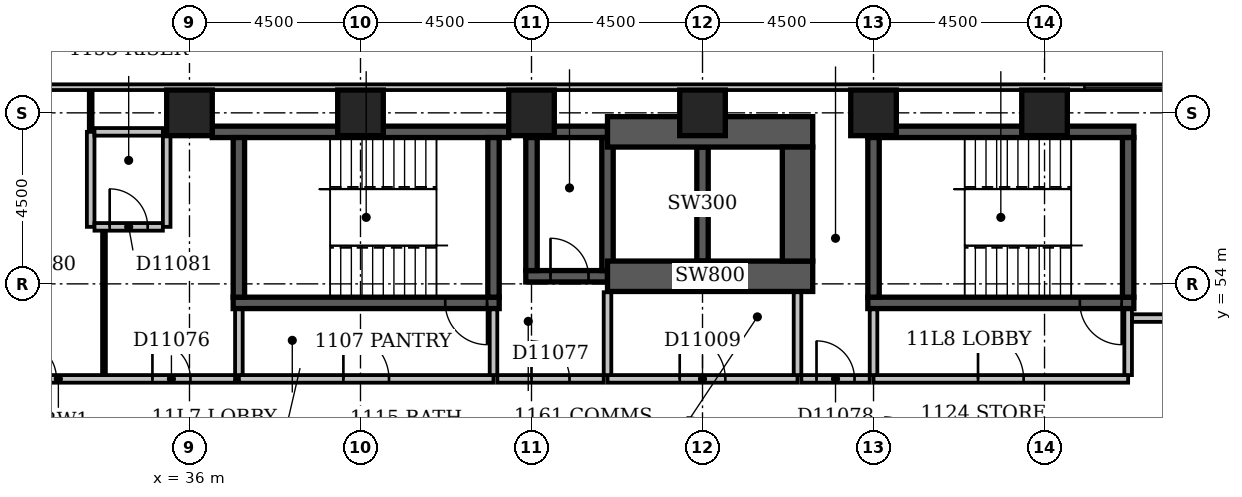
"""IFC4 building model, lengths in metres.
Left out: names, types, materials, properties, quantities, classifications, styles, units other than length and angle.
Written with IfcOpenShell. Run it as: python <this file> out.ifc"""

import sys

from ifc_helpers import new_model, si_unit, direction, frame, frame_2d, origin, origin_2d, place, context, subcontext, project, spatial, rectangle, extrude, element, fill, save


model = new_model("IFC4")
c1 = context("Model", 3, precision=1e-05, world=origin(), true_north=direction((0.0, 1.0)))
c2 = subcontext(c1, "Body", "Model", "MODEL_VIEW")
j1 = project(units=[si_unit("LENGTHUNIT", "METRE"), si_unit("PLANEANGLEUNIT", "RADIAN")], contexts=[c1])
p1 = place(None, origin())
s1 = spatial("IfcSite", under=j1, at=p1, CompositionType="ELEMENT")
p2 = place(p1, origin())
s2 = spatial("IfcBuilding", under=s1, at=p2, CompositionType="ELEMENT")
p3 = place(p2, frame((0.0, 0.0, 50.6)))
s3 = spatial("IfcBuildingStorey", under=s2, at=p3, CompositionType="ELEMENT", Elevation=50.6)
p4 = place(p3, frame((36.6, 58.0, -0.3), z_axis=(0.0, 0.0, 1.0), x_axis=(1.0, 0.0, 0.0)))
e1 = element("IfcWall", 1, at=p4, inside=s3, PredefinedType="SHEAR", context=c2, shape_type="SweptSolid", body=[
    extrude(rectangle(XDim=7.8, YDim=0.3, at=frame_2d((3.9, 0.0))), origin(), (0.0, 0.0, 1.0), 3.6),
])
p5 = place(p3, frame((37.15, 53.5, -0.3), z_axis=(0.0, 0.0, 1.0), x_axis=(1.0, 0.0, 0.0)))
e2 = element("IfcWall", 2, at=p5, inside=s3, PredefinedType="SHEAR", context=c2, shape_type="SweptSolid", body=[
    extrude(rectangle(XDim=7.0, YDim=0.3, at=frame_2d((3.5, 0.0))), origin(), (0.0, 0.0, 1.0), 3.6),
])
p6 = place(p5, frame((5.58, 0.0, 0.3)))
e3 = element("IfcOpeningElement", 3, at=p6, cuts=e2, PredefinedType="OPENING", context=c2, shape_type="SweptSolid", body=[
    extrude(rectangle(XDim=1.1, YDim=2.1, at=frame_2d((0.55, 1.05))), frame((0.0, 0.162, 0.0), z_axis=(0.0, -1.0, 0.0), x_axis=(1.0, 0.0, 0.0)), (0.0, 0.0, 1.0), 0.324),
])
for number, where, z_axis, x_axis in (
    (4, (37.3, 53.65, -0.3), (0.0, 0.0, 1.0), (0.0, 1.0, 0.0)),
    (5, (44.0, 53.65, -0.3), (0.0, 0.0, 1.0), (0.0, 1.0, 0.0)),
):
    element("IfcWall", number, at=place(p3, frame(where, z_axis=z_axis, x_axis=x_axis)), inside=s3, PredefinedType="SHEAR", context=c2, shape_type="SweptSolid", body=[
        extrude(rectangle(XDim=4.2, YDim=0.3, at=frame_2d((2.1, 0.0))), origin(), (0.0, 0.0, 1.0), 3.6),
    ])
p7 = place(p3, frame((44.85, 54.2, -0.3), z_axis=(0.0, 0.0, 1.0), x_axis=(1.0, 0.0, 0.0)))
e6 = element("IfcWall", 6, at=p7, inside=s3, PredefinedType="SHEAR", context=c2, shape_type="SweptSolid", body=[
    extrude(rectangle(XDim=2.15, YDim=0.3, at=frame_2d((1.075, 0.0))), origin(), (0.0, 0.0, 1.0), 3.6),
])
p8 = place(p7, frame((0.65, 0.0, 0.3)))
e7 = element("IfcOpeningElement", 7, at=p8, cuts=e6, PredefinedType="OPENING", context=c2, shape_type="SweptSolid", body=[
    extrude(rectangle(XDim=1.0, YDim=2.1, at=frame_2d((0.5, 1.05))), frame((0.0, 0.162, 0.0), z_axis=(0.0, -1.0, 0.0), x_axis=(1.0, 0.0, 0.0)), (0.0, 0.0, 1.0), 0.324),
])
p9 = place(p3, frame((44.85, 58.0, -0.3), z_axis=(0.0, 0.0, 1.0), x_axis=(1.0, 0.0, 0.0)))
e8 = element("IfcWall", 8, at=p9, inside=s3, PredefinedType="SHEAR", context=c2, shape_type="SweptSolid", body=[
    extrude(rectangle(XDim=2.15, YDim=0.3, at=frame_2d((1.075, 0.0))), origin(), (0.0, 0.0, 1.0), 3.6),
])
p10 = place(p3, frame((45.0, 54.35, -0.3), z_axis=(0.0, 0.0, 1.0), x_axis=(0.0, 1.0, 0.0)))
e9 = element("IfcWall", 9, at=p10, inside=s3, PredefinedType="SHEAR", context=c2, shape_type="SweptSolid", body=[
    extrude(rectangle(XDim=3.5, YDim=0.3, at=frame_2d((1.75, 0.0))), origin(), (0.0, 0.0, 1.0), 3.6),
])
p11 = place(p3, frame((47.0, 54.2, -0.3), z_axis=(0.0, 0.0, 1.0), x_axis=(1.0, 0.0, 0.0)))
e10 = element("IfcWall", 10, at=p11, inside=s3, PredefinedType="SHEAR", context=c2, shape_type="SweptSolid", body=[
    extrude(rectangle(XDim=5.4, YDim=0.8, at=frame_2d((2.7, 0.0))), origin(), (0.0, 0.0, 1.0), 3.6),
])
p12 = place(p3, frame((47.0, 54.35, -0.3), z_axis=(0.0, 0.0, 1.0), x_axis=(0.0, 1.0, 0.0)))
e11 = element("IfcWall", 11, at=p12, inside=s3, PredefinedType="SHEAR", context=c2, shape_type="SweptSolid", body=[
    extrude(rectangle(XDim=3.5, YDim=0.3, at=frame_2d((1.75, 0.0))), origin(), (0.0, 0.0, 1.0), 3.6),
])
p13 = place(p3, frame((47.0, 58.0, -0.3), z_axis=(0.0, 0.0, 1.0), x_axis=(1.0, 0.0, 0.0)))
e12 = element("IfcWall", 12, at=p13, inside=s3, PredefinedType="SHEAR", context=c2, shape_type="SweptSolid", body=[
    extrude(rectangle(XDim=5.4, YDim=0.8, at=frame_2d((2.7, 0.0))), origin(), (0.0, 0.0, 1.0), 3.6),
])
p14 = place(p3, frame((49.5, 54.6, -0.3), z_axis=(0.0, 0.0, 1.0), x_axis=(0.0, 1.0, 0.0)))
e13 = element("IfcWall", 13, at=p14, inside=s3, PredefinedType="SHEAR", context=c2, shape_type="SweptSolid", body=[
    extrude(rectangle(XDim=3.0, YDim=0.3, at=frame_2d((1.5, 0.0))), origin(), (0.0, 0.0, 1.0), 3.6),
])
p15 = place(p3, frame((52.0, 54.6, -0.3), z_axis=(0.0, 0.0, 1.0), x_axis=(0.0, 1.0, 0.0)))
e14 = element("IfcWall", 14, at=p15, inside=s3, PredefinedType="SHEAR", context=c2, shape_type="SweptSolid", body=[
    extrude(rectangle(XDim=3.0, YDim=0.8, at=frame_2d((1.5, 0.0))), origin(), (0.0, 0.0, 1.0), 3.6),
])
p16 = place(p3, frame((53.85, 53.5, -0.3), z_axis=(0.0, 0.0, 1.0), x_axis=(1.0, 0.0, 0.0)))
e15 = element("IfcWall", 15, at=p16, inside=s3, PredefinedType="SHEAR", context=c2, shape_type="SweptSolid", body=[
    extrude(rectangle(XDim=7.0, YDim=0.3, at=frame_2d((3.5, 0.0))), origin(), (0.0, 0.0, 1.0), 3.6),
])
p17 = place(p16, frame((5.58, 0.0, 0.3)))
e16 = element("IfcOpeningElement", 16, at=p17, cuts=e15, PredefinedType="OPENING", context=c2, shape_type="SweptSolid", body=[
    extrude(rectangle(XDim=1.1, YDim=2.1, at=frame_2d((0.55, 1.05))), frame((0.0, 0.162, 0.0), z_axis=(0.0, -1.0, 0.0), x_axis=(1.0, 0.0, 0.0)), (0.0, 0.0, 1.0), 0.324),
])
p18 = place(p3, frame((53.85, 58.0, -0.3), z_axis=(0.0, 0.0, 1.0), x_axis=(1.0, 0.0, 0.0)))
e17 = element("IfcWall", 17, at=p18, inside=s3, PredefinedType="SHEAR", context=c2, shape_type="SweptSolid", body=[
    extrude(rectangle(XDim=7.0, YDim=0.3, at=frame_2d((3.5, 0.0))), origin(), (0.0, 0.0, 1.0), 3.6),
])
for number, where, z_axis, x_axis in (
    (18, (54.0, 53.65, -0.3), (0.0, 0.0, 1.0), (0.0, 1.0, 0.0)),
    (19, (60.7, 53.65, -0.3), (0.0, 0.0, 1.0), (0.0, 1.0, 0.0)),
):
    element("IfcWall", number, at=place(p3, frame(where, z_axis=z_axis, x_axis=x_axis)), inside=s3, PredefinedType="SHEAR", context=c2, shape_type="SweptSolid", body=[
        extrude(rectangle(XDim=4.2, YDim=0.3, at=frame_2d((2.1, 0.0))), origin(), (0.0, 0.0, 1.0), 3.6),
    ])
for number, where, z_axis, x_axis in (
    (20, (36.0, 58.5, -0.3), (0.0, 0.0, 1.0), (1.0, 0.0, 0.0)),
    (21, (40.5, 58.5, -0.3), (0.0, 0.0, 1.0), (1.0, 0.0, 0.0)),
    (22, (45.0, 58.5, -0.3), (0.0, 0.0, 1.0), (1.0, 0.0, 0.0)),
    (23, (49.5, 58.5, -0.3), (0.0, 0.0, 1.0), (1.0, 0.0, 0.0)),
    (24, (54.0, 58.5, -0.3), (0.0, 0.0, 1.0), (1.0, 0.0, 0.0)),
    (25, (58.5, 58.5, -0.3), (0.0, 0.0, 1.0), (1.0, 0.0, 0.0)),
):
    element("IfcColumn", number, at=place(p3, frame(where, z_axis=z_axis, x_axis=x_axis)), inside=s3, PredefinedType="COLUMN", context=c2, shape_type="SweptSolid", body=[
        extrude(rectangle(XDim=1.2, YDim=1.2, at=origin_2d()), origin(), (0.0, 0.0, 1.0), 3.6),
    ])
p19 = place(p3, frame((68.1, 59.175, 0.0), z_axis=(0.0, 0.0, 1.0), x_axis=(-1.0, 0.0, 0.0)))
e26 = element("IfcWall", 26, at=p19, inside=s3, PredefinedType="STANDARD", context=c2, shape_type="SweptSolid", body=[
    extrude(rectangle(XDim=68.85, YDim=0.15, at=frame_2d((34.425, 0.0))), origin(), (0.0, 0.0, 1.0), 2.7),
])
p20 = place(p19, frame((2.977, 0.0, 0.6)))
e27 = element("IfcOpeningElement", 27, at=p20, cuts=e26, PredefinedType="OPENING", context=c2, shape_type="SweptSolid", body=[
    extrude(rectangle(XDim=1.2, YDim=1.8, at=frame_2d((0.6, 0.9))), frame((0.0, 0.087, 0.0), z_axis=(0.0, -1.0, 0.0), x_axis=(1.0, 0.0, 0.0)), (0.0, 0.0, 1.0), 0.174),
])
p21 = place(p19, frame((6.15, 0.0, 0.6)))
e28 = element("IfcOpeningElement", 28, at=p21, cuts=e26, PredefinedType="OPENING", context=c2, shape_type="SweptSolid", body=[
    extrude(rectangle(XDim=2.4, YDim=1.8, at=frame_2d((1.2, 0.9))), frame((0.0, 0.087, 0.0), z_axis=(0.0, -1.0, 0.0), x_axis=(1.0, 0.0, 0.0)), (0.0, 0.0, 1.0), 0.174),
])
p22 = place(p19, frame((37.65, 0.0, 0.6)))
e29 = element("IfcOpeningElement", 29, at=p22, cuts=e26, PredefinedType="OPENING", context=c2, shape_type="SweptSolid", body=[
    extrude(rectangle(XDim=2.4, YDim=1.8, at=frame_2d((1.2, 0.9))), frame((0.0, 0.087, 0.0), z_axis=(0.0, -1.0, 0.0), x_axis=(1.0, 0.0, 0.0)), (0.0, 0.0, 1.0), 0.174),
])
p23 = place(p3, frame((47.0, 51.5, 0.0), z_axis=(0.0, 0.0, 1.0), x_axis=(1.0, 0.0, 0.0)))
e30 = element("IfcWall", 30, at=p23, inside=s3, PredefinedType="PARTITIONING", context=c2, shape_type="SweptSolid", body=[
    extrude(rectangle(XDim=5.0, YDim=0.2, at=frame_2d((2.5, 0.0))), origin(), (0.0, 0.0, 1.0), 3.3),
])
p24 = place(p23, frame((1.9, 0.0, 0.0)))
e31 = element("IfcOpeningElement", 31, at=p24, cuts=e30, PredefinedType="OPENING", context=c2, shape_type="SweptSolid", body=[
    extrude(rectangle(XDim=1.2, YDim=2.1, at=frame_2d((0.6, 1.05))), frame((0.0, 0.112, 0.0), z_axis=(0.0, -1.0, 0.0), x_axis=(1.0, 0.0, 0.0)), (0.0, 0.0, 1.0), 0.224),
])
for number, where, z_axis, x_axis in (
    (32, (52.0, 51.6, 0.0), (0.0, 0.0, 1.0), (0.0, 1.0, 0.0)),
    (33, (47.0, 51.6, 0.0), (0.0, 0.0, 1.0), (0.0, 1.0, 0.0)),
):
    element("IfcWall", number, at=place(p3, frame(where, z_axis=z_axis, x_axis=x_axis)), inside=s3, PredefinedType="PARTITIONING", context=c2, shape_type="SweptSolid", body=[
        extrude(rectangle(XDim=2.18, YDim=0.2, at=frame_2d((1.09, 0.0))), origin(), (0.0, 0.0, 1.0), 3.3),
    ])
p25 = place(p3, frame((37.3, 51.5, 0.0), z_axis=(0.0, 0.0, 1.0), x_axis=(1.0, 0.0, 0.0)))
e34 = element("IfcWall", 34, at=p25, inside=s3, PredefinedType="PARTITIONING", context=c2, shape_type="SweptSolid", body=[
    extrude(rectangle(XDim=6.7, YDim=0.2, at=frame_2d((3.35, 0.0))), origin(), (0.0, 0.0, 1.0), 3.3),
])
p26 = place(p25, frame((2.75, 0.0, 0.0)))
e35 = element("IfcOpeningElement", 35, at=p26, cuts=e34, PredefinedType="OPENING", context=c2, shape_type="SweptSolid", body=[
    extrude(rectangle(XDim=1.2, YDim=2.1, at=frame_2d((0.6, 1.05))), frame((0.0, 0.112, 0.0), z_axis=(0.0, -1.0, 0.0), x_axis=(1.0, 0.0, 0.0)), (0.0, 0.0, 1.0), 0.224),
])
for number, where, z_axis, x_axis in (
    (36, (44.0, 51.6, 0.0), (0.0, 0.0, 1.0), (0.0, 1.0, 0.0)),
    (37, (37.3, 51.6, 0.0), (0.0, 0.0, 1.0), (0.0, 1.0, 0.0)),
):
    element("IfcWall", number, at=place(p3, frame(where, z_axis=z_axis, x_axis=x_axis)), inside=s3, PredefinedType="PARTITIONING", context=c2, shape_type="SweptSolid", body=[
        extrude(rectangle(XDim=1.73, YDim=0.2, at=frame_2d((0.865, 0.0))), origin(), (0.0, 0.0, 1.0), 3.3),
    ])
p27 = place(p3, frame((54.0, 51.5, 0.0), z_axis=(0.0, 0.0, 1.0), x_axis=(1.0, 0.0, 0.0)))
e38 = element("IfcWall", 38, at=p27, inside=s3, PredefinedType="PARTITIONING", context=c2, shape_type="SweptSolid", body=[
    extrude(rectangle(XDim=6.7, YDim=0.2, at=frame_2d((3.35, 0.0))), origin(), (0.0, 0.0, 1.0), 3.3),
])
p28 = place(p27, frame((2.75, 0.0, 0.0)))
e39 = element("IfcOpeningElement", 39, at=p28, cuts=e38, PredefinedType="OPENING", context=c2, shape_type="SweptSolid", body=[
    extrude(rectangle(XDim=1.2, YDim=2.1, at=frame_2d((0.6, 1.05))), frame((0.0, 0.112, 0.0), z_axis=(0.0, -1.0, 0.0), x_axis=(1.0, 0.0, 0.0)), (0.0, 0.0, 1.0), 0.224),
])
p29 = place(p3, frame((60.7, 51.6, 0.0), z_axis=(0.0, 0.0, 1.0), x_axis=(0.0, 1.0, 0.0)))
e40 = element("IfcWall", 40, at=p29, inside=s3, PredefinedType="PARTITIONING", context=c2, shape_type="SweptSolid", body=[
    extrude(rectangle(XDim=1.73, YDim=0.2, at=frame_2d((0.865, 0.0))), origin(), (0.0, 0.0, 1.0), 3.3),
])
p30 = place(p3, frame((54.0, 51.6, 0.0), z_axis=(0.0, 0.0, 1.0), x_axis=(0.0, 1.0, 0.0)))
e41 = element("IfcWall", 41, at=p30, inside=s3, PredefinedType="PARTITIONING", context=c2, shape_type="SweptSolid", body=[
    extrude(rectangle(XDim=1.73, YDim=0.2, at=frame_2d((0.865, 0.0))), origin(), (0.0, 0.0, 1.0), 2.6),
])
p31 = place(p3, frame((27.9, 51.5, 0.0), z_axis=(0.0, 0.0, 1.0), x_axis=(1.0, 0.0, 0.0)))
e42 = element("IfcWall", 42, at=p31, inside=s3, PredefinedType="PARTITIONING", context=c2, shape_type="SweptSolid", body=[
    extrude(rectangle(XDim=9.3, YDim=0.2, at=frame_2d((4.65, 0.0))), origin(), (0.0, 0.0, 1.0), 3.3),
])
p32 = place(p31, frame((0.675, 0.0, 0.0)))
e43 = element("IfcOpeningElement", 43, at=p32, cuts=e42, PredefinedType="OPENING", context=c2, shape_type="SweptSolid", body=[
    extrude(rectangle(XDim=0.9, YDim=2.1, at=frame_2d((0.45, 1.05))), frame((0.0, 0.112, 0.0), z_axis=(0.0, -1.0, 0.0), x_axis=(1.0, 0.0, 0.0)), (0.0, 0.0, 1.0), 0.224),
])
p33 = place(p31, frame((3.6, 0.0, 0.0)))
e44 = element("IfcOpeningElement", 44, at=p33, cuts=e42, PredefinedType="OPENING", context=c2, shape_type="SweptSolid", body=[
    extrude(rectangle(XDim=1.0, YDim=2.1, at=frame_2d((0.5, 1.05))), frame((0.0, 0.112, 0.0), z_axis=(0.0, -1.0, 0.0), x_axis=(1.0, 0.0, 0.0)), (0.0, 0.0, 1.0), 0.224),
])
p34 = place(p31, frame((7.125, 0.0, 0.0)))
e45 = element("IfcOpeningElement", 45, at=p34, cuts=e42, PredefinedType="OPENING", context=c2, shape_type="SweptSolid", body=[
    extrude(rectangle(XDim=1.0, YDim=2.1, at=frame_2d((0.5, 1.05))), frame((0.0, 0.112, 0.0), z_axis=(0.0, -1.0, 0.0), x_axis=(1.0, 0.0, 0.0)), (0.0, 0.0, 1.0), 0.224),
])
p35 = place(p3, frame((44.1, 51.5, 0.0), z_axis=(0.0, 0.0, 1.0), x_axis=(1.0, 0.0, 0.0)))
e46 = element("IfcWall", 46, at=p35, inside=s3, PredefinedType="PARTITIONING", context=c2, shape_type="SweptSolid", body=[
    extrude(rectangle(XDim=2.8, YDim=0.2, at=frame_2d((1.4, 0.0))), origin(), (0.0, 0.0, 1.0), 3.3),
])
p36 = place(p35, frame((0.9, 0.0, 0.0)))
e47 = element("IfcOpeningElement", 47, at=p36, cuts=e46, PredefinedType="OPENING", context=c2, shape_type="SweptSolid", body=[
    extrude(rectangle(XDim=1.0, YDim=2.1, at=frame_2d((0.5, 1.05))), frame((0.0, 0.112, 0.0), z_axis=(0.0, -1.0, 0.0), x_axis=(1.0, 0.0, 0.0)), (0.0, 0.0, 1.0), 0.224),
])
p37 = place(p3, frame((52.1, 51.5, 0.0), z_axis=(0.0, 0.0, 1.0), x_axis=(1.0, 0.0, 0.0)))
e48 = element("IfcWall", 48, at=p37, inside=s3, PredefinedType="PARTITIONING", context=c2, shape_type="SweptSolid", body=[
    extrude(rectangle(XDim=1.8, YDim=0.2, at=frame_2d((0.9, 0.0))), origin(), (0.0, 0.0, 1.0), 3.3),
])
p38 = place(p37, frame((0.4, 0.0, 0.0)))
e49 = element("IfcOpeningElement", 49, at=p38, cuts=e48, PredefinedType="OPENING", context=c2, shape_type="SweptSolid", body=[
    extrude(rectangle(XDim=1.0, YDim=2.1, at=frame_2d((0.5, 1.05))), frame((0.0, 0.112, 0.0), z_axis=(0.0, -1.0, 0.0), x_axis=(1.0, 0.0, 0.0)), (0.0, 0.0, 1.0), 0.224),
])
p39 = place(p3, frame((33.75, 51.6, 0.0), z_axis=(0.0, 0.0, 1.0), x_axis=(0.0, 1.0, 0.0)))
e50 = element("IfcWall", 50, at=p39, inside=s3, PredefinedType="PARTITIONING", context=c2, shape_type="SweptSolid", body=[
    extrude(rectangle(XDim=3.8, YDim=0.1, at=frame_2d((1.9, 0.0))), origin(), (0.0, 0.0, 1.0), 3.3),
])
p40 = place(p3, frame((60.8, 53.1, 0.0), z_axis=(0.0, 0.0, 1.0), x_axis=(1.0, 0.0, 0.0)))
e51 = element("IfcWall", 51, at=p40, inside=s3, PredefinedType="PARTITIONING", context=c2, shape_type="SweptSolid", body=[
    extrude(rectangle(XDim=7.3, YDim=0.2, at=frame_2d((3.65, 0.0))), origin(), (0.0, 0.0, 1.0), 3.3),
])
p41 = place(p40, frame((2.85, 0.0, 0.0)))
e52 = element("IfcOpeningElement", 52, at=p41, cuts=e51, PredefinedType="OPENING", context=c2, shape_type="SweptSolid", body=[
    extrude(rectangle(XDim=0.9, YDim=2.1, at=frame_2d((0.45, 1.05))), frame((0.0, 0.112, 0.0), z_axis=(0.0, -1.0, 0.0), x_axis=(1.0, 0.0, 0.0)), (0.0, 0.0, 1.0), 0.224),
])
p42 = place(p3, frame((33.4, 55.5, 0.0), z_axis=(0.0, 0.0, 1.0), x_axis=(0.0, 1.0, 0.0)))
e53 = element("IfcWall", 53, at=p42, inside=s3, PredefinedType="PARTITIONING", context=c2, shape_type="SweptSolid", body=[
    extrude(rectangle(XDim=2.5, YDim=0.2, at=frame_2d((1.25, 0.0))), origin(), (0.0, 0.0, 1.0), 3.3),
])
p43 = place(p3, frame((33.5, 55.5, 0.0), z_axis=(0.0, 0.0, 1.0), x_axis=(1.0, 0.0, 0.0)))
e54 = element("IfcWall", 54, at=p43, inside=s3, PredefinedType="PARTITIONING", context=c2, shape_type="SweptSolid", body=[
    extrude(rectangle(XDim=1.8, YDim=0.2, at=frame_2d((0.9, 0.0))), origin(), (0.0, 0.0, 1.0), 3.3),
])
p44 = place(p43, frame((0.4, 0.0, 0.0)))
e55 = element("IfcOpeningElement", 55, at=p44, cuts=e54, PredefinedType="OPENING", context=c2, shape_type="SweptSolid", body=[
    extrude(rectangle(XDim=1.0, YDim=2.1, at=frame_2d((0.5, 1.05))), frame((0.0, 0.112, 0.0), z_axis=(0.0, -1.0, 0.0), x_axis=(1.0, 0.0, 0.0)), (0.0, 0.0, 1.0), 0.224),
])
p45 = place(p3, frame((35.4, 55.5, 0.0), z_axis=(0.0, 0.0, 1.0), x_axis=(0.0, 1.0, 0.0)))
e56 = element("IfcWall", 56, at=p45, inside=s3, PredefinedType="PARTITIONING", context=c2, shape_type="SweptSolid", body=[
    extrude(rectangle(XDim=2.5, YDim=0.2, at=frame_2d((1.25, 0.0))), origin(), (0.0, 0.0, 1.0), 2.4),
])
p46 = place(p3, frame((33.4, 58.0, 0.0), z_axis=(0.0, 0.0, 1.0), x_axis=(0.0, 1.0, 0.0)))
e57 = element("IfcWall", 57, at=p46, inside=s3, PredefinedType="PARTITIONING", context=c2, shape_type="SweptSolid", body=[
    extrude(rectangle(XDim=1.1, YDim=0.1, at=frame_2d((0.55, 0.0))), origin(), (0.0, 0.0, 1.0), 3.3),
])
p47 = place(p3, frame((33.5, 58.0, 0.0), z_axis=(0.0, 0.0, 1.0), x_axis=(1.0, 0.0, 0.0)))
e58 = element("IfcWall", 58, at=p47, inside=s3, PredefinedType="PARTITIONING", context=c2, shape_type="SweptSolid", body=[
    extrude(rectangle(XDim=1.8, YDim=0.2, at=frame_2d((0.9, 0.0))), origin(), (0.0, 0.0, 1.0), 3.3),
])
p48 = place(p21, origin())
e59 = element("IfcWindow", 59, at=p48, inside=s3, PartitioningType="SINGLE_PANEL", PredefinedType="WINDOW", context=c2, shape_type="SweptSolid", body=[
    extrude(rectangle(XDim=2.4, YDim=1.8, at=frame_2d((1.2, 0.9))), frame((0.0, 0.03, 0.0), z_axis=(0.0, -1.0, 0.0), x_axis=(1.0, 0.0, 0.0)), (0.0, 0.0, 1.0), 0.06),
])
fill(e28, e59)
p49 = place(p26, origin())
e60 = element("IfcDoor", 60, at=p49, inside=s3, OperationType="SINGLE_SWING_LEFT", PredefinedType="DOOR", context=c2, shape_type="SweptSolid", body=[
    extrude(rectangle(XDim=1.2, YDim=2.1, at=frame_2d((0.6, 1.05))), frame((0.0, 0.025, 0.0), z_axis=(0.0, -1.0, 0.0), x_axis=(1.0, 0.0, 0.0)), (0.0, 0.0, 1.0), 0.05),
])
fill(e35, e60)
p50 = place(p28, origin())
e61 = element("IfcDoor", 61, at=p50, inside=s3, OperationType="SINGLE_SWING_LEFT", PredefinedType="DOOR", context=c2, shape_type="SweptSolid", body=[
    extrude(rectangle(XDim=1.2, YDim=2.1, at=frame_2d((0.6, 1.05))), frame((0.0, 0.025, 0.0), z_axis=(0.0, -1.0, 0.0), x_axis=(1.0, 0.0, 0.0)), (0.0, 0.0, 1.0), 0.05),
])
fill(e39, e61)
p51 = place(p24, origin())
e62 = element("IfcDoor", 62, at=p51, inside=s3, OperationType="SINGLE_SWING_LEFT", PredefinedType="DOOR", context=c2, shape_type="SweptSolid", body=[
    extrude(rectangle(XDim=1.2, YDim=2.1, at=frame_2d((0.6, 1.05))), frame((0.0, 0.025, 0.0), z_axis=(0.0, -1.0, 0.0), x_axis=(1.0, 0.0, 0.0)), (0.0, 0.0, 1.0), 0.05),
])
fill(e31, e62)
p52 = place(p8, origin())
e63 = element("IfcDoor", 63, at=p52, inside=s3, OperationType="SINGLE_SWING_LEFT", PredefinedType="DOOR", context=c2, shape_type="SweptSolid", body=[
    extrude(rectangle(XDim=1.0, YDim=2.1, at=frame_2d((0.5, 1.05))), frame((0.0, 0.025, 0.0), z_axis=(0.0, -1.0, 0.0), x_axis=(1.0, 0.0, 0.0)), (0.0, 0.0, 1.0), 0.05),
])
fill(e7, e63)
p53 = place(p6, origin())
e64 = element("IfcDoor", 64, at=p53, inside=s3, OperationType="SINGLE_SWING_RIGHT", PredefinedType="DOOR", context=c2, shape_type="SweptSolid", body=[
    extrude(rectangle(XDim=1.1, YDim=2.1, at=frame_2d((0.55, 1.05))), frame((0.0, 0.025, 0.0), z_axis=(0.0, -1.0, 0.0), x_axis=(1.0, 0.0, 0.0)), (0.0, 0.0, 1.0), 0.05),
])
fill(e3, e64)
p54 = place(p17, origin())
e65 = element("IfcDoor", 65, at=p54, inside=s3, OperationType="SINGLE_SWING_RIGHT", PredefinedType="DOOR", context=c2, shape_type="SweptSolid", body=[
    extrude(rectangle(XDim=1.1, YDim=2.1, at=frame_2d((0.55, 1.05))), frame((0.0, 0.025, 0.0), z_axis=(0.0, -1.0, 0.0), x_axis=(1.0, 0.0, 0.0)), (0.0, 0.0, 1.0), 0.05),
])
fill(e16, e65)
p55 = place(p33, origin())
e66 = element("IfcDoor", 66, at=p55, inside=s3, OperationType="SINGLE_SWING_LEFT", PredefinedType="DOOR", context=c2, shape_type="SweptSolid", body=[
    extrude(rectangle(XDim=1.0, YDim=2.1, at=frame_2d((0.5, 1.05))), frame((0.0, 0.025, 0.0), z_axis=(0.0, -1.0, 0.0), x_axis=(1.0, 0.0, 0.0)), (0.0, 0.0, 1.0), 0.05),
])
fill(e44, e66)
p56 = place(p34, origin())
e67 = element("IfcDoor", 67, at=p56, inside=s3, OperationType="SINGLE_SWING_LEFT", PredefinedType="DOOR", context=c2, shape_type="SweptSolid", body=[
    extrude(rectangle(XDim=1.0, YDim=2.1, at=frame_2d((0.5, 1.05))), frame((0.0, 0.025, 0.0), z_axis=(0.0, -1.0, 0.0), x_axis=(1.0, 0.0, 0.0)), (0.0, 0.0, 1.0), 0.05),
])
fill(e45, e67)
p57 = place(p36, origin())
e68 = element("IfcDoor", 68, at=p57, inside=s3, OperationType="SINGLE_SWING_LEFT", PredefinedType="DOOR", context=c2, shape_type="SweptSolid", body=[
    extrude(rectangle(XDim=1.0, YDim=2.1, at=frame_2d((0.5, 1.05))), frame((0.0, 0.025, 0.0), z_axis=(0.0, -1.0, 0.0), x_axis=(1.0, 0.0, 0.0)), (0.0, 0.0, 1.0), 0.05),
])
fill(e47, e68)
p58 = place(p38, origin())
e69 = element("IfcDoor", 69, at=p58, inside=s3, OperationType="SINGLE_SWING_LEFT", PredefinedType="DOOR", context=c2, shape_type="SweptSolid", body=[
    extrude(rectangle(XDim=1.0, YDim=2.1, at=frame_2d((0.5, 1.05))), frame((0.0, 0.025, 0.0), z_axis=(0.0, -1.0, 0.0), x_axis=(1.0, 0.0, 0.0)), (0.0, 0.0, 1.0), 0.05),
])
fill(e49, e69)
p59 = place(p44, origin())
e70 = element("IfcDoor", 70, at=p59, inside=s3, OperationType="SINGLE_SWING_LEFT", PredefinedType="DOOR", context=c2, shape_type="SweptSolid", body=[
    extrude(rectangle(XDim=1.0, YDim=2.1, at=frame_2d((0.5, 1.05))), frame((0.0, 0.025, 0.0), z_axis=(0.0, -1.0, 0.0), x_axis=(1.0, 0.0, 0.0)), (0.0, 0.0, 1.0), 0.05),
])
fill(e55, e70)
save(model, sys.argv[1])
